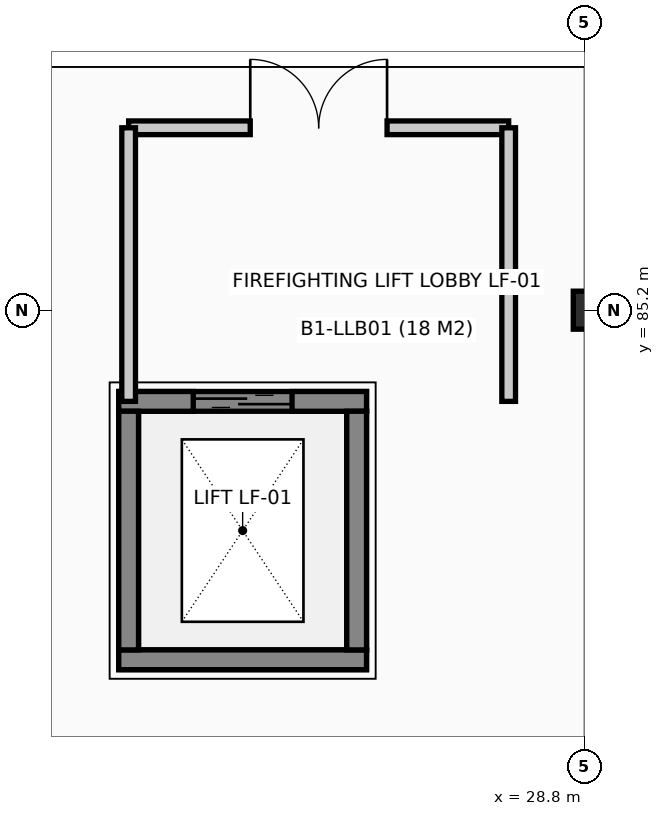
"""IFC4 building model, lengths in metres.
Left out: names, types, materials, properties, quantities, classifications, styles, units other than length and angle.
Written with IfcOpenShell. Run it as: python <this file> out.ifc"""

import sys

from ifc_helpers import new_model, si_unit, direction, frame, frame_2d, origin, origin_2d, place, context, subcontext, project, spatial, rectangle, i_section, extrude, element, fill, save


model = new_model("IFC4")
c1 = context("Model", 3, precision=1e-05, world=origin(), true_north=direction((0.0, 1.0)))
c2 = subcontext(c1, "Body", "Model", "MODEL_VIEW")
j1 = project(units=[si_unit("LENGTHUNIT", "METRE"), si_unit("PLANEANGLEUNIT", "RADIAN")], contexts=[c1])
p1 = place(None, origin())
s1 = spatial("IfcSite", under=j1, at=p1, CompositionType="ELEMENT")
p2 = place(p1, origin())
s2 = spatial("IfcBuilding", under=s1, at=p2, CompositionType="ELEMENT")
p3 = place(p2, frame((0.0, 0.0, -4.8)))
s3 = spatial("IfcBuildingStorey", under=s2, at=p3, CompositionType="ELEMENT", Elevation=-4.8)
p4 = place(p3, frame((28.8, 85.2, 0.0), z_axis=(0.0, 0.0, 1.0), x_axis=(1.0, 0.0, 0.0)))
e1 = element("IfcColumn", 1, at=p4, inside=s3, PredefinedType="COLUMN", context=c2, shape_type="SweptSolid", body=[
    extrude(i_section(OverallWidth=0.3, OverallDepth=0.5, WebThickness=0.014, FlangeThickness=0.028, at=origin_2d()), origin(), (0.0, 0.0, 1.0), 4.8),
])
for number, where, z_axis, x_axis in (
    (2, (22.67, 80.6, -1.5), (0.0, 0.0, 1.0), (1.0, 0.0, 0.0)),
    (3, (22.67, 84.0, -1.5), (0.0, 0.0, 1.0), (1.0, 0.0, 0.0)),
):
    element("IfcWall", number, at=place(p3, frame(where, z_axis=z_axis, x_axis=x_axis)), inside=s3, PredefinedType="SHEAR", context=c2, shape_type="SweptSolid", body=[
        extrude(rectangle(XDim=3.26, YDim=0.26, at=frame_2d((1.63, 0.0))), origin(), (0.0, 0.0, 1.0), 1.5),
    ])
for number, where, z_axis, x_axis in (
    (4, (22.8, 80.73, -1.5), (0.0, 0.0, 1.0), (0.0, 1.0, 0.0)),
    (5, (25.8, 80.73, -1.5), (0.0, 0.0, 1.0), (0.0, 1.0, 0.0)),
):
    element("IfcWall", number, at=place(p3, frame(where, z_axis=z_axis, x_axis=x_axis)), inside=s3, PredefinedType="SHEAR", context=c2, shape_type="SweptSolid", body=[
        extrude(rectangle(XDim=3.14, YDim=0.26, at=frame_2d((1.57, 0.0))), origin(), (0.0, 0.0, 1.0), 1.5),
    ])
p5 = place(p3, frame((22.67, 80.6, 0.0), z_axis=(0.0, 0.0, 1.0), x_axis=(1.0, 0.0, 0.0)))
e6 = element("IfcWall", 6, at=p5, inside=s3, PredefinedType="SHEAR", context=c2, shape_type="SweptSolid", body=[
    extrude(rectangle(XDim=3.26, YDim=0.26, at=frame_2d((1.63, 0.0))), origin(), (0.0, 0.0, 1.0), 4.55),
])
p6 = place(p3, frame((22.67, 84.0, 0.0), z_axis=(0.0, 0.0, 1.0), x_axis=(1.0, 0.0, 0.0)))
e7 = element("IfcWall", 7, at=p6, inside=s3, PredefinedType="SHEAR", context=c2, shape_type="SweptSolid", body=[
    extrude(rectangle(XDim=3.26, YDim=0.26, at=frame_2d((1.63, 0.0))), origin(), (0.0, 0.0, 1.0), 4.55),
])
p7 = place(p6, frame((0.98, 0.0, 0.0)))
e8 = element("IfcOpeningElement", 8, at=p7, cuts=e7, PredefinedType="OPENING", context=c2, shape_type="SweptSolid", body=[
    extrude(rectangle(XDim=1.3, YDim=2.2, at=frame_2d((0.65, 1.1))), frame((0.0, 0.14, 0.0), z_axis=(0.0, -1.0, 0.0), x_axis=(1.0, 0.0, 0.0)), (0.0, 0.0, 1.0), 0.28),
])
for number, where, z_axis, x_axis in (
    (9, (22.8, 80.73, 0.0), (0.0, 0.0, 1.0), (0.0, 1.0, 0.0)),
    (10, (25.8, 80.73, 0.0), (0.0, 0.0, 1.0), (0.0, 1.0, 0.0)),
):
    element("IfcWall", number, at=place(p3, frame(where, z_axis=z_axis, x_axis=x_axis)), inside=s3, PredefinedType="SHEAR", context=c2, shape_type="SweptSolid", body=[
        extrude(rectangle(XDim=3.14, YDim=0.26, at=frame_2d((1.57, 0.0))), origin(), (0.0, 0.0, 1.0), 4.55),
    ])
p8 = place(p3, frame((22.8, 87.6, 0.0), z_axis=(0.0, 0.0, 1.0), x_axis=(1.0, 0.0, 0.0)))
e11 = element("IfcWall", 11, at=p8, inside=s3, PredefinedType="PARTITIONING", context=c2, shape_type="SweptSolid", body=[
    extrude(rectangle(XDim=5.0, YDim=0.18, at=frame_2d((2.5, 0.0))), origin(), (0.0, 0.0, 1.0), 4.2),
])
p9 = place(p8, frame((1.6, 0.0, 0.0)))
e12 = element("IfcOpeningElement", 12, at=p9, cuts=e11, PredefinedType="OPENING", context=c2, shape_type="SweptSolid", body=[
    extrude(rectangle(XDim=1.8, YDim=2.15, at=frame_2d((0.9, 1.075))), frame((0.0, 0.1, 0.0), z_axis=(0.0, -1.0, 0.0), x_axis=(1.0, 0.0, 0.0)), (0.0, 0.0, 1.0), 0.2),
])
for number, where, z_axis, x_axis in (
    (13, (22.8, 84.0, 0.0), (0.0, 0.0, 1.0), (0.0, 1.0, 0.0)),
    (14, (27.8, 84.0, 0.0), (0.0, 0.0, 1.0), (0.0, 1.0, 0.0)),
):
    element("IfcWall", number, at=place(p3, frame(where, z_axis=z_axis, x_axis=x_axis)), inside=s3, PredefinedType="PARTITIONING", context=c2, shape_type="SweptSolid", body=[
        extrude(rectangle(XDim=3.6, YDim=0.18, at=frame_2d((1.8, 0.0))), origin(), (0.0, 0.0, 1.0), 3.63),
    ])
p10 = place(p7, origin())
e15 = element("IfcDoor", 15, at=p10, inside=s3, OperationType="DOUBLE_DOOR_SLIDING", PredefinedType="DOOR", context=c2, shape_type="SweptSolid", body=[
    extrude(rectangle(XDim=1.3, YDim=2.2, at=frame_2d((0.65, 1.1))), frame((0.0, 0.025, 0.0), z_axis=(0.0, -1.0, 0.0), x_axis=(1.0, 0.0, 0.0)), (0.0, 0.0, 1.0), 0.05),
])
fill(e8, e15)
p11 = place(p9, origin())
e16 = element("IfcDoor", 16, at=p11, inside=s3, OperationType="DOUBLE_DOOR_SINGLE_SWING", PredefinedType="DOOR", context=c2, shape_type="SweptSolid", body=[
    extrude(rectangle(XDim=1.8, YDim=2.15, at=frame_2d((0.9, 1.075))), frame((0.0, 0.025, 0.0), z_axis=(0.0, -1.0, 0.0), x_axis=(1.0, 0.0, 0.0)), (0.0, 0.0, 1.0), 0.05),
])
fill(e12, e16)
save(model, sys.argv[1])
